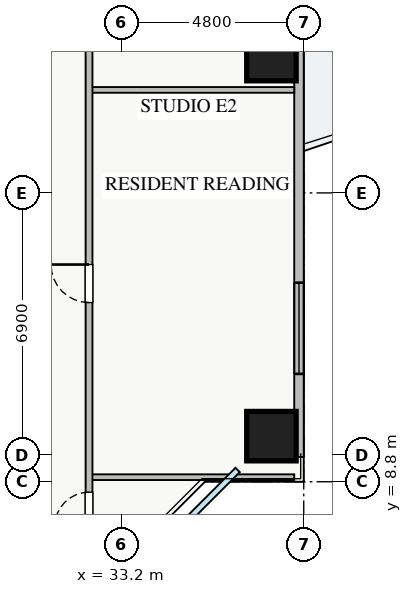
"""IFC4 building model, lengths in metres.
Left out: names, types, materials, properties, quantities, classifications, styles, units other than length and angle.
Written with IfcOpenShell. Run it as: python <this file> out.ifc"""

import sys

from ifc_helpers import new_model, si_unit, direction, frame, frame_2d, origin, origin_2d, place, context, subcontext, project, spatial, rectangle, extrude, source, transform, mapped, element, fill, save


model = new_model("IFC4")
c1 = context("Model", 3, precision=1e-05, world=origin(), true_north=direction((0.0, 1.0)))
c2 = subcontext(c1, "Body", "Model", "MODEL_VIEW")
j1 = project(units=[si_unit("LENGTHUNIT", "METRE"), si_unit("PLANEANGLEUNIT", "RADIAN")], contexts=[c1])
p1 = place(None, origin())
s1 = spatial("IfcSite", under=j1, at=p1, CompositionType="ELEMENT")
p2 = place(p1, origin())
s2 = spatial("IfcBuilding", under=s1, at=p2, CompositionType="ELEMENT")
p3 = place(p2, frame((0.0, 0.0, 42.5)))
s3 = spatial("IfcBuildingStorey", under=s2, at=p3, CompositionType="ELEMENT", Elevation=42.5)
m1 = source(origin(), c2, "Body", "SweptSolid", [
    extrude(rectangle(XDim=1.3, YDim=1.3, at=origin_2d()), origin(), (0.0, 0.0, 1.0), 3.25),
])
for number, where, z_axis, x_axis in (
    (1, (37.15, 10.0, 0.0), (0.0, 0.0, 1.0), (1.0, 0.0, 0.0)),
    (2, (37.15, 20.0, 0.0), (0.0, 0.0, 1.0), (1.0, 0.0, 0.0)),
):
    element("IfcColumn", number, at=place(p3, frame(where, z_axis=z_axis, x_axis=x_axis)), inside=s3, PredefinedType="COLUMN", context=c2, shape_type="MappedRepresentation", body=[
        mapped(m1, transform((0.0, 0.0, 0.0), x_axis=(1.0, 0.0, 0.0), y_axis=(0.0, 1.0, 0.0), z_axis=(0.0, 0.0, 1.0), scale=1.0)),
    ])
p4 = place(p3, frame((37.875, 9.45, 0.0), z_axis=(0.0, 0.0, 1.0), x_axis=(0.0, 1.0, 0.0)))
e3 = element("IfcWall", 3, at=p4, inside=s3, PredefinedType="STANDARD", context=c2, shape_type="SweptSolid", body=[
    extrude(rectangle(XDim=27.1, YDim=0.25, at=frame_2d((13.55, 0.0))), origin(), (0.0, 0.0, 1.0), 2.57),
])
p5 = place(p4, frame((14.4, 0.0, 0.0)))
e4 = element("IfcOpeningElement", 4, at=p5, cuts=e3, PredefinedType="OPENING", context=c2, shape_type="SweptSolid", body=[
    extrude(rectangle(XDim=1.2, YDim=2.1, at=frame_2d((0.6, 1.05))), frame((0.0, 0.135, 0.0), z_axis=(0.0, -1.0, 0.0), x_axis=(1.0, 0.0, 0.0)), (0.0, 0.0, 1.0), 0.27),
])
p6 = place(p4, frame((2.188, 0.0, 0.9)))
e5 = element("IfcOpeningElement", 5, at=p6, cuts=e3, PredefinedType="OPENING", context=c2, shape_type="SweptSolid", body=[
    extrude(rectangle(XDim=2.4, YDim=1.48, at=frame_2d((1.2, 0.74))), frame((0.0, 0.135, 0.0), z_axis=(0.0, -1.0, 0.0), x_axis=(1.0, 0.0, 0.0)), (0.0, 0.0, 1.0), 0.27),
])
p7 = place(p4, frame((23.788, 0.0, 0.9)))
e6 = element("IfcOpeningElement", 6, at=p7, cuts=e3, PredefinedType="OPENING", context=c2, shape_type="SweptSolid", body=[
    extrude(rectangle(XDim=1.8, YDim=1.5, at=frame_2d((0.9, 0.75))), frame((0.0, 0.135, 0.0), z_axis=(0.0, -1.0, 0.0), x_axis=(1.0, 0.0, 0.0)), (0.0, 0.0, 1.0), 0.27),
])
p8 = place(p4, frame((19.758, 0.0, 0.9)))
e7 = element("IfcOpeningElement", 7, at=p8, cuts=e3, PredefinedType="OPENING", context=c2, shape_type="SweptSolid", body=[
    extrude(rectangle(XDim=2.4, YDim=1.5, at=frame_2d((1.2, 0.75))), frame((0.0, 0.135, 0.0), z_axis=(0.0, -1.0, 0.0), x_axis=(1.0, 0.0, 0.0)), (0.0, 0.0, 1.0), 0.27),
])
p9 = place(p4, frame((11.365, 0.0, 0.9)))
e8 = element("IfcOpeningElement", 8, at=p9, cuts=e3, PredefinedType="OPENING", context=c2, shape_type="SweptSolid", body=[
    extrude(rectangle(XDim=0.9, YDim=1.2, at=frame_2d((0.45, 0.6))), frame((0.0, 0.135, 0.0), z_axis=(0.0, -1.0, 0.0), x_axis=(1.0, 0.0, 0.0)), (0.0, 0.0, 1.0), 0.27),
])
for number, where, z_axis, x_axis in (
    (9, (32.35, 8.92, 0.0), (0.0, 0.0, 1.0), (1.0, 0.0, 0.0)),
    (10, (32.35, 19.11, 0.0), (0.0, 0.0, 1.0), (1.0, 0.0, 0.0)),
):
    element("IfcWall", number, at=place(p3, frame(where, z_axis=z_axis, x_axis=x_axis)), inside=s3, PredefinedType="PARTITIONING", context=c2, shape_type="SweptSolid", body=[
        extrude(rectangle(XDim=5.4, YDim=0.15, at=frame_2d((2.7, 0.0))), origin(), (0.0, 0.0, 1.0), 3.03),
    ])
p10 = place(p3, frame((32.35, 7.21, 0.0), z_axis=(0.0, 0.0, 1.0), x_axis=(0.0, 1.0, 0.0)))
e11 = element("IfcWall", 11, at=p10, inside=s3, PredefinedType="PARTITIONING", context=c2, shape_type="SweptSolid", body=[
    extrude(rectangle(XDim=31.23, YDim=0.18, at=frame_2d((15.615, 0.0))), origin(), (0.0, 0.0, 1.0), 2.825),
])
p11 = place(p10, frame((30.09, 0.0, 0.0)))
e12 = element("IfcOpeningElement", 12, at=p11, cuts=e11, PredefinedType="OPENING", context=c2, shape_type="SweptSolid", body=[
    extrude(rectangle(XDim=0.9, YDim=2.05, at=frame_2d((0.45, 1.025))), frame((0.0, 0.1, 0.0), z_axis=(0.0, -1.0, 0.0), x_axis=(1.0, 0.0, 0.0)), (0.0, 0.0, 1.0), 0.2),
])
p12 = place(p10, frame((0.415, 0.0, 0.0)))
e13 = element("IfcOpeningElement", 13, at=p12, cuts=e11, PredefinedType="OPENING", context=c2, shape_type="SweptSolid", body=[
    extrude(rectangle(XDim=0.9, YDim=2.05, at=frame_2d((0.45, 1.025))), frame((0.0, 0.1, 0.0), z_axis=(0.0, -1.0, 0.0), x_axis=(1.0, 0.0, 0.0)), (0.0, 0.0, 1.0), 0.2),
])
p13 = place(p10, frame((6.305, 0.0, 0.0)))
e14 = element("IfcOpeningElement", 14, at=p13, cuts=e11, PredefinedType="OPENING", context=c2, shape_type="SweptSolid", body=[
    extrude(rectangle(XDim=1.0, YDim=2.05, at=frame_2d((0.5, 1.025))), frame((0.0, 0.1, 0.0), z_axis=(0.0, -1.0, 0.0), x_axis=(1.0, 0.0, 0.0)), (0.0, 0.0, 1.0), 0.2),
])
p14 = place(p10, frame((13.205, 0.0, 0.0)))
e15 = element("IfcOpeningElement", 15, at=p14, cuts=e11, PredefinedType="OPENING", context=c2, shape_type="SweptSolid", body=[
    extrude(rectangle(XDim=1.0, YDim=2.05, at=frame_2d((0.5, 1.025))), frame((0.0, 0.1, 0.0), z_axis=(0.0, -1.0, 0.0), x_axis=(1.0, 0.0, 0.0)), (0.0, 0.0, 1.0), 0.2),
])
p15 = place(p10, frame((22.5, 0.0, 0.0)))
e16 = element("IfcOpeningElement", 16, at=p15, cuts=e11, PredefinedType="OPENING", context=c2, shape_type="SweptSolid", body=[
    extrude(rectangle(XDim=1.0, YDim=2.05, at=frame_2d((0.5, 1.025))), frame((0.0, 0.1, 0.0), z_axis=(0.0, -1.0, 0.0), x_axis=(1.0, 0.0, 0.0)), (0.0, 0.0, 1.0), 0.2),
])
m2 = source(origin(), c2, "Body", "SweptSolid", [
    extrude(rectangle(XDim=2.4, YDim=1.48, at=frame_2d((1.2, 0.74))), frame((0.0, 0.03, 0.0), z_axis=(0.0, -1.0, 0.0), x_axis=(1.0, 0.0, 0.0)), (0.0, 0.0, 1.0), 0.06),
])
p16 = place(p6, origin())
e17 = element("IfcWindow", 17, at=p16, inside=s3, PartitioningType="TRIPLE_PANEL_VERTICAL", PredefinedType="WINDOW", context=c2, shape_type="MappedRepresentation", body=[
    mapped(m2, transform((0.0, 0.0, 0.0), x_axis=(1.0, 0.0, 0.0), y_axis=(0.0, 1.0, 0.0), z_axis=(0.0, 0.0, 1.0), scale=1.0)),
])
fill(e5, e17)
m3 = source(origin(), c2, "Body", "SweptSolid", [
    extrude(rectangle(XDim=0.9, YDim=2.05, at=frame_2d((0.45, 1.025))), frame((0.0, 0.025, 0.0), z_axis=(0.0, -1.0, 0.0), x_axis=(1.0, 0.0, 0.0)), (0.0, 0.0, 1.0), 0.05),
])
p17 = place(p12, origin())
e18 = element("IfcDoor", 18, at=p17, inside=s3, OperationType="SINGLE_SWING_LEFT", PredefinedType="DOOR", context=c2, shape_type="MappedRepresentation", body=[
    mapped(m3, transform((0.0, 0.0, 0.0), x_axis=(1.0, 0.0, 0.0), y_axis=(0.0, 1.0, 0.0), z_axis=(0.0, 0.0, 1.0), scale=1.0)),
])
fill(e13, e18)
m4 = source(origin(), c2, "Body", "SweptSolid", [
    extrude(rectangle(XDim=1.0, YDim=2.05, at=frame_2d((0.5, 1.025))), frame((0.0, 0.025, 0.0), z_axis=(0.0, -1.0, 0.0), x_axis=(1.0, 0.0, 0.0)), (0.0, 0.0, 1.0), 0.05),
])
p18 = place(p13, origin())
e19 = element("IfcDoor", 19, at=p18, inside=s3, OperationType="SINGLE_SWING_RIGHT", PredefinedType="DOOR", context=c2, shape_type="MappedRepresentation", body=[
    mapped(m4, transform((0.0, 0.0, 0.0), x_axis=(1.0, 0.0, 0.0), y_axis=(0.0, 1.0, 0.0), z_axis=(0.0, 0.0, 1.0), scale=1.0)),
])
fill(e14, e19)
save(model, sys.argv[1])
